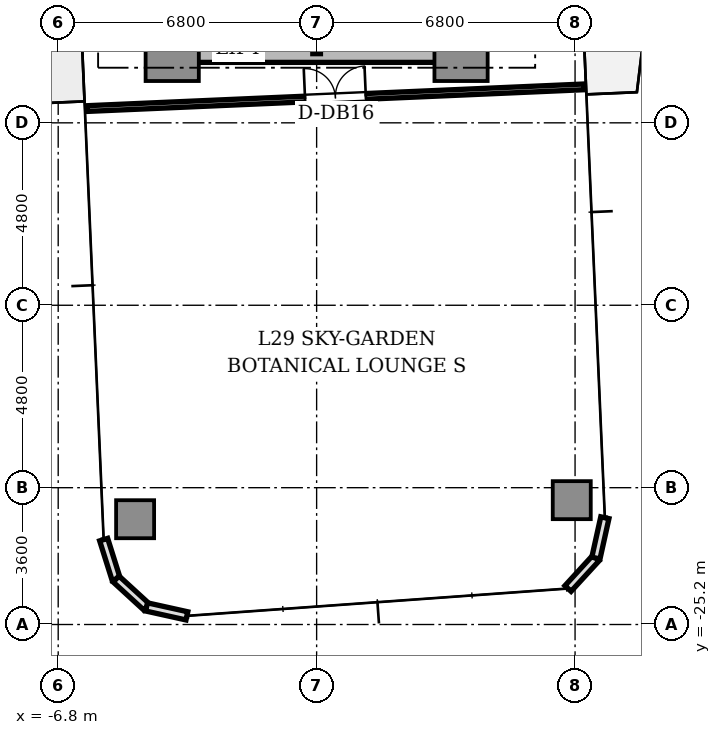
"""IFC4 building model, lengths in metres.
Left out: names, types, materials, properties, quantities, classifications, styles, units other than length and angle.
Written with IfcOpenShell. Run it as: python <this file> out.ifc"""

import sys

from ifc_helpers import new_model, si_unit, direction, frame, frame_2d, origin, origin_2d, place, context, subcontext, project, spatial, rectangle, extrude, source, transform, mapped, element, fill, save


model = new_model("IFC4")
c1 = context("Model", 3, precision=1e-05, world=origin(), true_north=direction((0.0, 1.0)))
c2 = subcontext(c1, "Body", "Model", "MODEL_VIEW")
j1 = project(units=[si_unit("LENGTHUNIT", "METRE"), si_unit("PLANEANGLEUNIT", "RADIAN")], contexts=[c1])
p1 = place(None, origin())
s1 = spatial("IfcSite", under=j1, at=p1, CompositionType="ELEMENT")
p2 = place(p1, origin())
s2 = spatial("IfcBuilding", under=s1, at=p2, CompositionType="ELEMENT")
p3 = place(p2, frame((0.0, 0.0, 106.95)))
s3 = spatial("IfcBuildingStorey", under=s2, at=p3, CompositionType="ELEMENT", Elevation=106.95)
p4 = place(p3, frame((-3.55, -10.2, 0.0), z_axis=(0.0, 0.0, 1.0), x_axis=(1.0, 0.0, 0.0)))
e1 = element("IfcWall", 1, at=p4, inside=s3, PredefinedType="SHEAR", context=c2, shape_type="SweptSolid", body=[
    extrude(rectangle(XDim=7.1, YDim=0.42, at=frame_2d((3.55, 0.0))), origin(), (0.0, 0.0, 1.0), 4.26),
])
m1 = source(origin(), c2, "Body", "SweptSolid", [
    extrude(rectangle(XDim=1.4, YDim=1.4, at=origin_2d()), origin(), (0.0, 0.0, 1.0), 4.26),
])
for number, where, z_axis, x_axis in (
    (2, (-3.8, -10.2, 0.0), (0.0, 0.0, 1.0), (1.0, 0.0, 0.0)),
    (3, (3.8, -10.2, 0.0), (0.0, 0.0, 1.0), (1.0, 0.0, 0.0)),
):
    element("IfcColumn", number, at=place(p3, frame(where, z_axis=z_axis, x_axis=x_axis)), inside=s3, PredefinedType="COLUMN", context=c2, shape_type="MappedRepresentation", body=[
        mapped(m1, transform((0.0, 0.0, 0.0), scale=1.0)),
    ])
m2 = source(origin(), c2, "Body", "SweptSolid", [
    extrude(rectangle(XDim=1.0, YDim=1.0, at=origin_2d()), origin(), (0.0, 0.0, 1.0), 4.26),
])
for number, where, z_axis, x_axis in (
    (4, (-4.776, -22.43, 0.0), (0.0, 0.0, 1.0), (1.0, 0.0, 0.0)),
    (5, (6.713, -21.928, 0.0), (0.0, 0.0, 1.0), (1.0, 0.0, 0.0)),
):
    element("IfcColumn", number, at=place(p3, frame(where, z_axis=z_axis, x_axis=x_axis)), inside=s3, PredefinedType="COLUMN", context=c2, shape_type="MappedRepresentation", body=[
        mapped(m2, transform((0.0, 0.0, 0.0), scale=1.0)),
    ])
p5 = place(p3, frame((-5.604, -22.966, 0.0), z_axis=(0.0, 0.0, 1.0), x_axis=(0.300755105707, -0.953701403161, 0.0)))
e6 = element("IfcWall", 6, at=p5, inside=s3, PredefinedType="STANDARD", context=c2, shape_type="SweptSolid", body=[
    extrude(rectangle(XDim=1.087, YDim=0.22, at=frame_2d((0.543, 0.0))), origin(), (0.0, 0.0, 1.0), 4.26),
])
p6 = place(p3, frame((-5.277, -24.003, 0.0), z_axis=(0.0, 0.0, 1.0), x_axis=(0.737312600672, -0.675551721847, 0.0)))
e7 = element("IfcWall", 7, at=p6, inside=s3, PredefinedType="STANDARD", context=c2, shape_type="SweptSolid", body=[
    extrude(rectangle(XDim=1.087, YDim=0.22, at=frame_2d((0.543, 0.0))), origin(), (0.0, 0.0, 1.0), 4.26),
])
for number, where, z_axis, x_axis in (
    (8, (-4.475, -24.737, 0.0), (0.0, 0.0, 1.0), (0.976, -0.217, 0.0)),
    (9, (6.614, -24.253, 0.0), (0.0, 0.0, 1.0), (0.676, 0.737, 0.0)),
):
    element("IfcWall", number, at=place(p3, frame(where, z_axis=z_axis, x_axis=x_axis)), inside=s3, PredefinedType="STANDARD", context=c2, shape_type="SweptSolid", body=[
        extrude(rectangle(XDim=1.087, YDim=0.22, at=frame_2d((0.543, 0.0))), origin(), (0.0, 0.0, 1.0), 4.26),
    ])
p7 = place(p3, frame((7.349, -23.452, 0.0), z_axis=(0.0, 0.0, 1.0), x_axis=(0.216454939174, 0.976292609471, 0.0)))
e10 = element("IfcWall", 10, at=p7, inside=s3, PredefinedType="STANDARD", context=c2, shape_type="SweptSolid", body=[
    extrude(rectangle(XDim=1.087, YDim=0.22, at=frame_2d((0.544, 0.0))), origin(), (0.0, 0.0, 1.0), 4.26),
])
p8 = place(p3, frame((0.0, -10.18, 0.0), z_axis=(0.0, 0.0, 1.0), x_axis=(0.0, 1.0, 0.0)))
e11 = element("IfcWall", 11, at=p8, inside=s3, PredefinedType="SOLIDWALL", context=c2, shape_type="SweptSolid", body=[
    extrude(rectangle(XDim=7.68, YDim=0.2, at=frame_2d((3.84, 0.0))), origin(), (0.0, 0.0, 1.0), 4.26),
])
p9 = place(p8, frame((0.28, 0.0, 0.0)))
e12 = element("IfcOpeningElement", 12, at=p9, cuts=e11, PredefinedType="OPENING", context=c2, shape_type="SweptSolid", body=[
    extrude(rectangle(XDim=1.1, YDim=2.15, at=frame_2d((0.55, 1.075))), frame((0.0, 0.11, 0.0), z_axis=(0.0, -1.0, 0.0), x_axis=(1.0, 0.0, 0.0)), (0.0, 0.0, 1.0), 0.22),
])
p10 = place(p3, frame((-6.049, -11.625, 0.0), z_axis=(0.0, 0.0, 1.0), x_axis=(0.999047806124, 0.043628901879, 0.0)))
e13 = element("IfcWall", 13, at=p10, inside=s3, PredefinedType="PARTITIONING", context=c2, shape_type="SweptSolid", body=[
    extrude(rectangle(XDim=13.1, YDim=0.15, at=frame_2d((6.55, 0.0))), origin(), (0.0, 0.0, 1.0), 3.81),
])
p11 = place(p10, frame((5.75, 0.0, 0.0)))
e14 = element("IfcOpeningElement", 14, at=p11, cuts=e13, PredefinedType="OPENING", context=c2, shape_type="SweptSolid", body=[
    extrude(rectangle(XDim=1.6, YDim=2.25, at=frame_2d((0.8, 1.125))), frame((0.0, 0.085, 0.0), z_axis=(0.0, -1.0, 0.0), x_axis=(1.0, 0.0, 0.0)), (0.0, 0.0, 1.0), 0.17),
])
m3 = source(origin(), c2, "Body", "SweptSolid", [
    extrude(rectangle(XDim=1.6, YDim=0.05, at=origin_2d()), origin(), (0.0, 0.0, 1.0), 2.25),
])
p12 = place(p11, frame((0.8, 0.0, 0.0)))
e15 = element("IfcDoor", 15, at=p12, inside=s3, OperationType="DOUBLE_DOOR_SINGLE_SWING", PredefinedType="DOOR", context=c2, shape_type="MappedRepresentation", body=[
    mapped(m3, transform((0.0, 0.0, 0.0), scale=1.0)),
])
fill(e14, e15)
save(model, sys.argv[1])
